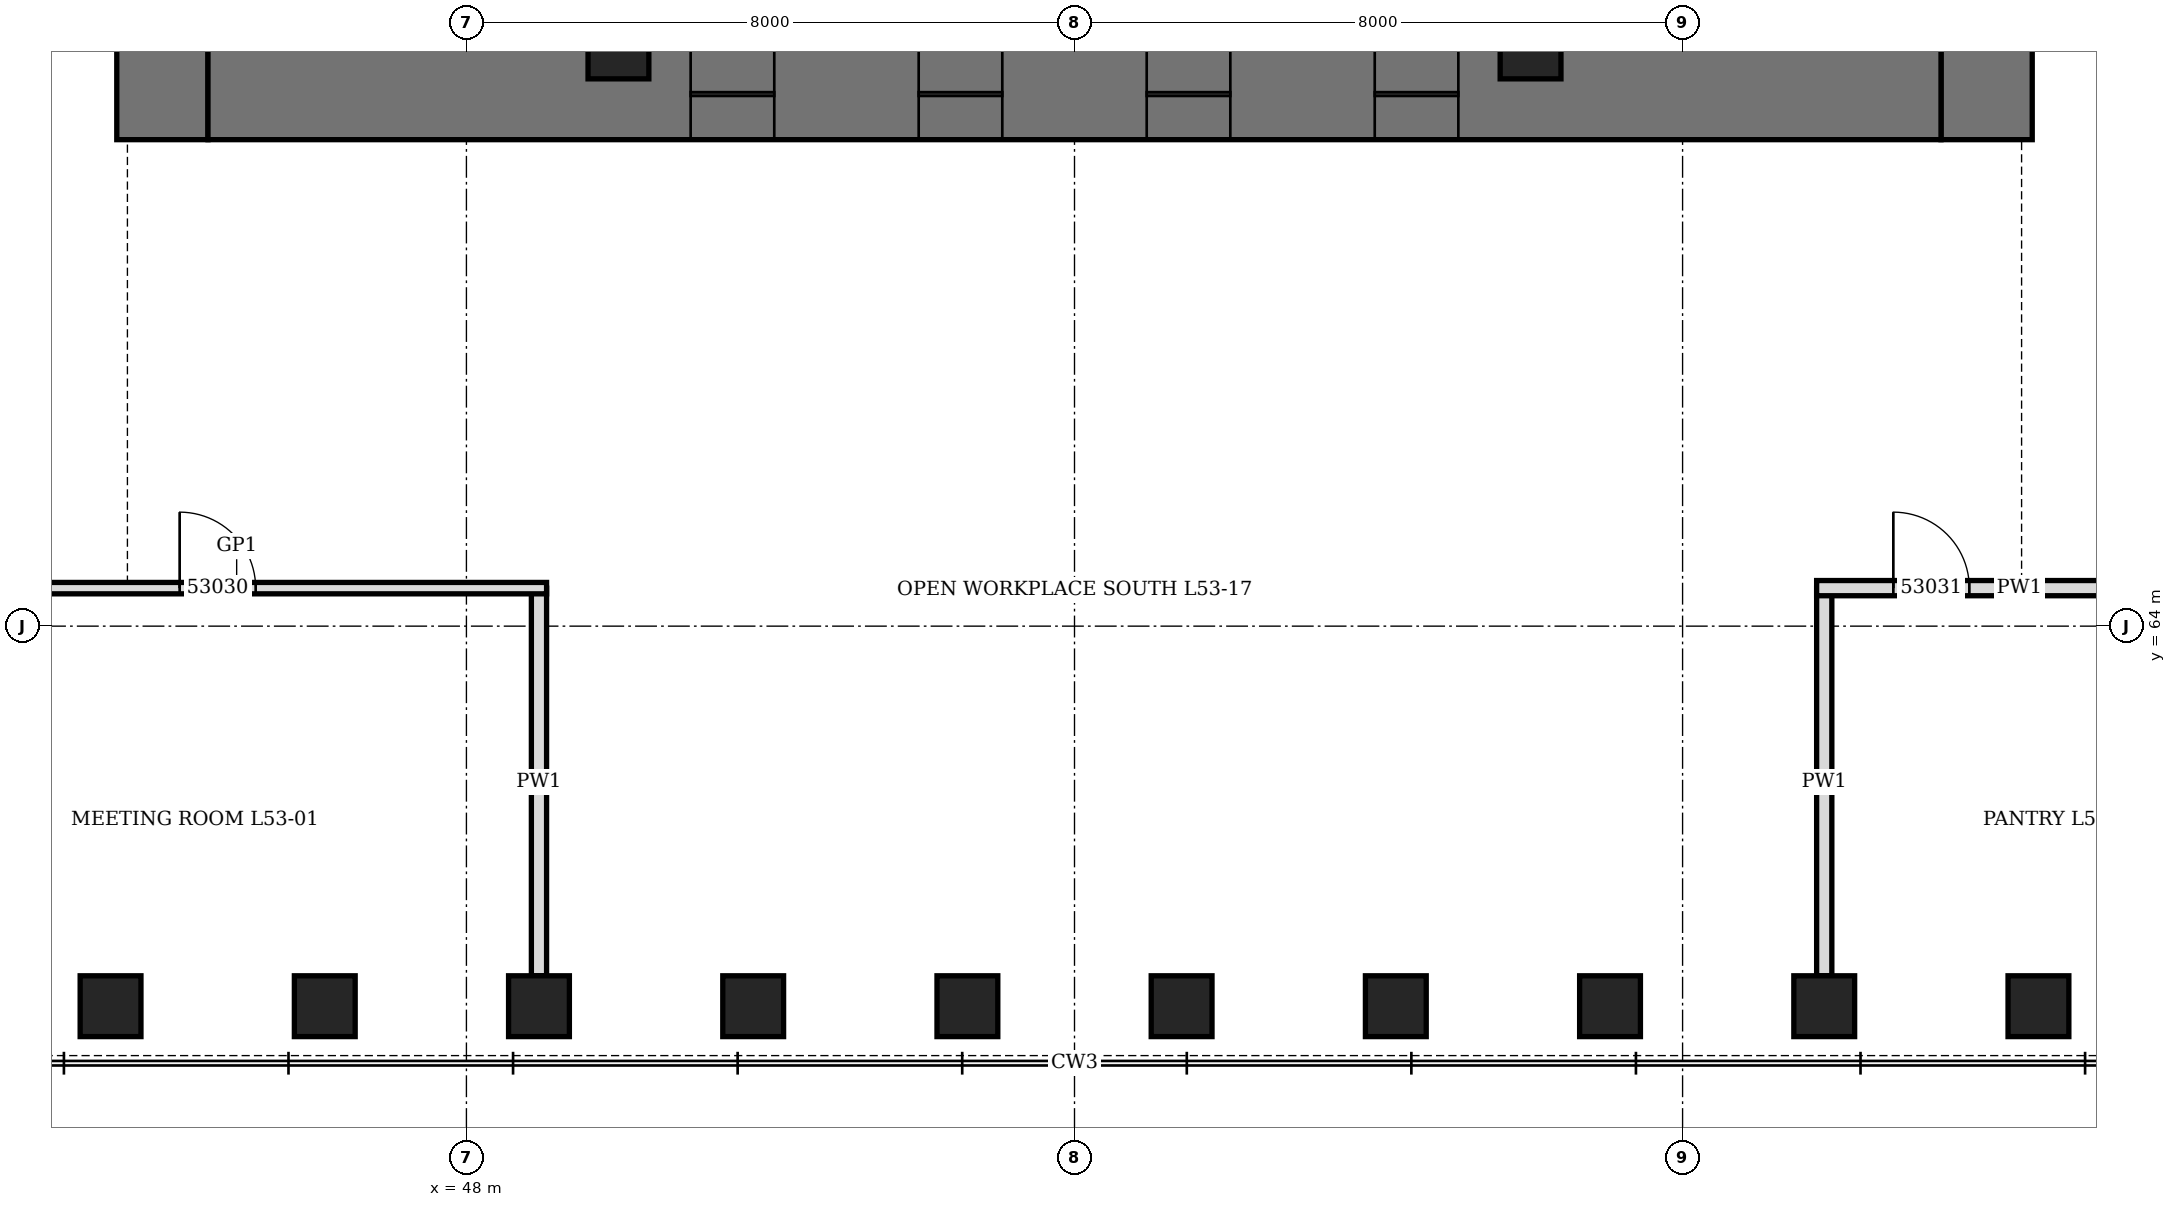
"""IFC4 building model, lengths in metres.
Left out: names, types, materials, properties, quantities, classifications, styles, units other than length and angle.
Written with IfcOpenShell. Run it as: python <this file> out.ifc"""

import sys

from ifc_helpers import new_model, si_unit, direction, frame, frame_2d, origin, origin_2d, place, context, subcontext, project, spatial, rectangle, hollow_rectangle, extrude, element, fill, save


model = new_model("IFC4")
c1 = context("Model", 3, precision=1e-05, world=origin(), true_north=direction((0.0, 1.0)))
c2 = subcontext(c1, "Body", "Model", "MODEL_VIEW")
j1 = project(units=[si_unit("LENGTHUNIT", "METRE"), si_unit("PLANEANGLEUNIT", "RADIAN")], contexts=[c1])
p1 = place(None, origin())
s1 = spatial("IfcSite", under=j1, at=p1, CompositionType="ELEMENT")
p2 = place(p1, origin())
s2 = spatial("IfcBuilding", under=s1, at=p2, CompositionType="ELEMENT")
p3 = place(p2, frame((0.0, 0.0, 235.9)))
s3 = spatial("IfcBuildingStorey", under=s2, at=p3, CompositionType="ELEMENT", Elevation=235.9)
for number, where, z_axis, x_axis in (
    (1, (43.318, 59.0, 0.0), (0.0, 0.0, 1.0), (1.0, 0.0, 0.0)),
    (2, (46.136, 59.0, 0.0), (0.0, 0.0, 1.0), (1.0, 0.0, 0.0)),
    (3, (48.955, 59.0, 0.0), (0.0, 0.0, 1.0), (1.0, 0.0, 0.0)),
    (4, (51.773, 59.0, 0.0), (0.0, 0.0, 1.0), (1.0, 0.0, 0.0)),
    (5, (54.591, 59.0, 0.0), (0.0, 0.0, 1.0), (1.0, 0.0, 0.0)),
    (6, (57.409, 59.0, 0.0), (0.0, 0.0, 1.0), (1.0, 0.0, 0.0)),
    (7, (60.227, 59.0, 0.0), (0.0, 0.0, 1.0), (1.0, 0.0, 0.0)),
    (8, (63.045, 59.0, 0.0), (0.0, 0.0, 1.0), (1.0, 0.0, 0.0)),
    (9, (65.864, 59.0, 0.0), (0.0, 0.0, 1.0), (1.0, 0.0, 0.0)),
    (10, (68.682, 59.0, 0.0), (0.0, 0.0, 1.0), (1.0, 0.0, 0.0)),
):
    element("IfcColumn", number, at=place(p3, frame(where, z_axis=z_axis, x_axis=x_axis)), inside=s3, PredefinedType="COLUMN", context=c2, shape_type="SweptSolid", body=[
        extrude(hollow_rectangle(XDim=0.8, YDim=0.8, WallThickness=0.08, at=origin_2d()), origin(), (0.0, 0.0, 1.0), 4.2),
    ])
p4 = place(p3, frame((44.0, 70.4, 0.0), z_axis=(0.0, 0.0, 1.0), x_axis=(0.0, 1.0, 0.0)))
e11 = element("IfcWall", 11, at=p4, inside=s3, PredefinedType="SHEAR", context=c2, shape_type="SweptSolid", body=[
    extrude(rectangle(XDim=19.2, YDim=1.2, at=frame_2d((9.6, 0.0))), origin(), (0.0, 0.0, 1.0), 4.2),
])
p5 = place(p4, frame((8.6, 0.0, 0.0)))
e12 = element("IfcOpeningElement", 12, at=p5, cuts=e11, PredefinedType="OPENING", context=c2, shape_type="SweptSolid", body=[
    extrude(rectangle(XDim=2.0, YDim=2.4, at=frame_2d((1.0, 1.2))), frame((0.0, 0.61, 0.0), z_axis=(0.0, -1.0, 0.0), x_axis=(1.0, 0.0, 0.0)), (0.0, 0.0, 1.0), 1.22),
])
p6 = place(p3, frame((68.0, 70.4, 0.0), z_axis=(0.0, 0.0, 1.0), x_axis=(0.0, 1.0, 0.0)))
e13 = element("IfcWall", 13, at=p6, inside=s3, PredefinedType="SHEAR", context=c2, shape_type="SweptSolid", body=[
    extrude(rectangle(XDim=19.2, YDim=1.2, at=frame_2d((9.6, 0.0))), origin(), (0.0, 0.0, 1.0), 4.2),
])
p7 = place(p6, frame((8.6, 0.0, 0.0)))
e14 = element("IfcOpeningElement", 14, at=p7, cuts=e13, PredefinedType="OPENING", context=c2, shape_type="SweptSolid", body=[
    extrude(rectangle(XDim=2.0, YDim=2.4, at=frame_2d((1.0, 1.2))), frame((0.0, 0.61, 0.0), z_axis=(0.0, -1.0, 0.0), x_axis=(1.0, 0.0, 0.0)), (0.0, 0.0, 1.0), 1.22),
])
p8 = place(p3, frame((44.6, 71.0, 0.0), z_axis=(0.0, 0.0, 1.0), x_axis=(1.0, 0.0, 0.0)))
e15 = element("IfcWall", 15, at=p8, inside=s3, PredefinedType="SHEAR", context=c2, shape_type="SweptSolid", body=[
    extrude(rectangle(XDim=22.8, YDim=1.2, at=frame_2d((11.4, 0.0))), origin(), (0.0, 0.0, 1.0), 4.2),
])
p9 = place(p8, frame((6.35, 0.0, 0.0)))
e16 = element("IfcOpeningElement", 16, at=p9, cuts=e15, PredefinedType="OPENING", context=c2, shape_type="SweptSolid", body=[
    extrude(rectangle(XDim=1.1, YDim=2.2, at=frame_2d((0.55, 1.1))), frame((0.0, 0.61, 0.0), z_axis=(0.0, -1.0, 0.0), x_axis=(1.0, 0.0, 0.0)), (0.0, 0.0, 1.0), 1.22),
])
p10 = place(p8, frame((9.35, 0.0, 0.0)))
e17 = element("IfcOpeningElement", 17, at=p10, cuts=e15, PredefinedType="OPENING", context=c2, shape_type="SweptSolid", body=[
    extrude(rectangle(XDim=1.1, YDim=2.2, at=frame_2d((0.55, 1.1))), frame((0.0, 0.61, 0.0), z_axis=(0.0, -1.0, 0.0), x_axis=(1.0, 0.0, 0.0)), (0.0, 0.0, 1.0), 1.22),
])
p11 = place(p8, frame((12.35, 0.0, 0.0)))
e18 = element("IfcOpeningElement", 18, at=p11, cuts=e15, PredefinedType="OPENING", context=c2, shape_type="SweptSolid", body=[
    extrude(rectangle(XDim=1.1, YDim=2.2, at=frame_2d((0.55, 1.1))), frame((0.0, 0.61, 0.0), z_axis=(0.0, -1.0, 0.0), x_axis=(1.0, 0.0, 0.0)), (0.0, 0.0, 1.0), 1.22),
])
p12 = place(p8, frame((15.35, 0.0, 0.0)))
e19 = element("IfcOpeningElement", 19, at=p12, cuts=e15, PredefinedType="OPENING", context=c2, shape_type="SweptSolid", body=[
    extrude(rectangle(XDim=1.1, YDim=2.2, at=frame_2d((0.55, 1.1))), frame((0.0, 0.61, 0.0), z_axis=(0.0, -1.0, 0.0), x_axis=(1.0, 0.0, 0.0)), (0.0, 0.0, 1.0), 1.22),
])
for number, where, z_axis, x_axis in (
    (20, (50.0, 71.6, 0.0), (0.0, 0.0, 1.0), (1.0, 0.0, 0.0)),
    (21, (62.0, 71.6, 0.0), (0.0, 0.0, 1.0), (1.0, 0.0, 0.0)),
):
    element("IfcColumn", number, at=place(p3, frame(where, z_axis=z_axis, x_axis=x_axis)), inside=s3, PredefinedType="COLUMN", context=c2, shape_type="SweptSolid", body=[
        extrude(hollow_rectangle(XDim=0.8, YDim=0.8, WallThickness=0.1, at=origin_2d()), origin(), (0.0, 0.0, 1.0), 4.2),
    ])
for number, where, z_axis, x_axis in (
    (22, (48.955, 59.4, 0.0), (0.0, 0.0, 1.0), (0.0, 1.0, 0.0)),
    (23, (65.864, 59.4, 0.0), (0.0, 0.0, 1.0), (0.0, 1.0, 0.0)),
):
    element("IfcWall", number, at=place(p3, frame(where, z_axis=z_axis, x_axis=x_axis)), inside=s3, PredefinedType="PARTITIONING", context=c2, shape_type="SweptSolid", body=[
        extrude(rectangle(XDim=5.1, YDim=0.2, at=frame_2d((2.55, 0.0))), origin(), (0.0, 0.0, 1.0), 3.428),
    ])
p13 = place(p3, frame((40.9, 64.5, 0.0), z_axis=(0.0, 0.0, 1.0), x_axis=(1.0, 0.0, 0.0)))
e24 = element("IfcWall", 24, at=p13, inside=s3, PredefinedType="PARTITIONING", context=c2, shape_type="SweptSolid", body=[
    extrude(rectangle(XDim=8.155, YDim=0.15, at=frame_2d((4.077, 0.0))), origin(), (0.0, 0.0, 1.0), 4.04),
])
p14 = place(p13, frame((3.327, 0.0, 0.0)))
e25 = element("IfcOpeningElement", 25, at=p14, cuts=e24, PredefinedType="OPENING", context=c2, shape_type="SweptSolid", body=[
    extrude(rectangle(XDim=1.0, YDim=2.4, at=frame_2d((0.5, 1.2))), frame((0.0, 0.085, 0.0), z_axis=(0.0, -1.0, 0.0), x_axis=(1.0, 0.0, 0.0)), (0.0, 0.0, 1.0), 0.17),
])
p15 = place(p3, frame((65.764, 64.5, 0.0), z_axis=(0.0, 0.0, 1.0), x_axis=(1.0, 0.0, 0.0)))
e26 = element("IfcWall", 26, at=p15, inside=s3, PredefinedType="PARTITIONING", context=c2, shape_type="SweptSolid", body=[
    extrude(rectangle(XDim=5.336, YDim=0.2, at=frame_2d((2.668, 0.0))), origin(), (0.0, 0.0, 1.0), 4.04),
])
p16 = place(p15, frame((1.009, 0.0, 0.0)))
e27 = element("IfcOpeningElement", 27, at=p16, cuts=e26, PredefinedType="OPENING", context=c2, shape_type="SweptSolid", body=[
    extrude(rectangle(XDim=1.0, YDim=2.1, at=frame_2d((0.5, 1.05))), frame((0.0, 0.11, 0.0), z_axis=(0.0, -1.0, 0.0), x_axis=(1.0, 0.0, 0.0)), (0.0, 0.0, 1.0), 0.22),
])
p17 = place(p9, origin())
e28 = element("IfcDoor", 28, at=p17, inside=s3, OperationType="SLIDING_TO_LEFT", PredefinedType="DOOR", context=c2, shape_type="SweptSolid", body=[
    extrude(rectangle(XDim=1.1, YDim=2.2, at=frame_2d((0.55, 1.1))), frame((0.0, 0.35, 0.0), z_axis=(0.0, -1.0, 0.0), x_axis=(1.0, 0.0, 0.0)), (0.0, 0.0, 1.0), 0.7),
])
fill(e16, e28)
p18 = place(p10, origin())
e29 = element("IfcDoor", 29, at=p18, inside=s3, OperationType="SLIDING_TO_LEFT", PredefinedType="DOOR", context=c2, shape_type="SweptSolid", body=[
    extrude(rectangle(XDim=1.1, YDim=2.2, at=frame_2d((0.55, 1.1))), frame((0.0, 0.35, 0.0), z_axis=(0.0, -1.0, 0.0), x_axis=(1.0, 0.0, 0.0)), (0.0, 0.0, 1.0), 0.7),
])
fill(e17, e29)
p19 = place(p11, origin())
e30 = element("IfcDoor", 30, at=p19, inside=s3, OperationType="SLIDING_TO_LEFT", PredefinedType="DOOR", context=c2, shape_type="SweptSolid", body=[
    extrude(rectangle(XDim=1.1, YDim=2.2, at=frame_2d((0.55, 1.1))), frame((0.0, 0.35, 0.0), z_axis=(0.0, -1.0, 0.0), x_axis=(1.0, 0.0, 0.0)), (0.0, 0.0, 1.0), 0.7),
])
fill(e18, e30)
p20 = place(p12, origin())
e31 = element("IfcDoor", 31, at=p20, inside=s3, OperationType="SLIDING_TO_LEFT", PredefinedType="DOOR", context=c2, shape_type="SweptSolid", body=[
    extrude(rectangle(XDim=1.1, YDim=2.2, at=frame_2d((0.55, 1.1))), frame((0.0, 0.35, 0.0), z_axis=(0.0, -1.0, 0.0), x_axis=(1.0, 0.0, 0.0)), (0.0, 0.0, 1.0), 0.7),
])
fill(e19, e31)
p21 = place(p14, origin())
e32 = element("IfcDoor", 32, at=p21, inside=s3, OperationType="SINGLE_SWING_RIGHT", PredefinedType="DOOR", context=c2, shape_type="SweptSolid", body=[
    extrude(rectangle(XDim=1.0, YDim=2.4, at=frame_2d((0.5, 1.2))), frame((0.0, 0.075, 0.0), z_axis=(0.0, -1.0, 0.0), x_axis=(1.0, 0.0, 0.0)), (0.0, 0.0, 1.0), 0.149),
])
fill(e25, e32)
p22 = place(p16, origin())
e33 = element("IfcDoor", 33, at=p22, inside=s3, OperationType="SINGLE_SWING_LEFT", PredefinedType="DOOR", context=c2, shape_type="SweptSolid", body=[
    extrude(rectangle(XDim=1.0, YDim=2.1, at=frame_2d((0.5, 1.05))), frame((0.0, 0.1, 0.0), z_axis=(0.0, -1.0, 0.0), x_axis=(1.0, 0.0, 0.0)), (0.0, 0.0, 1.0), 0.199),
])
fill(e27, e33)
save(model, sys.argv[1])
